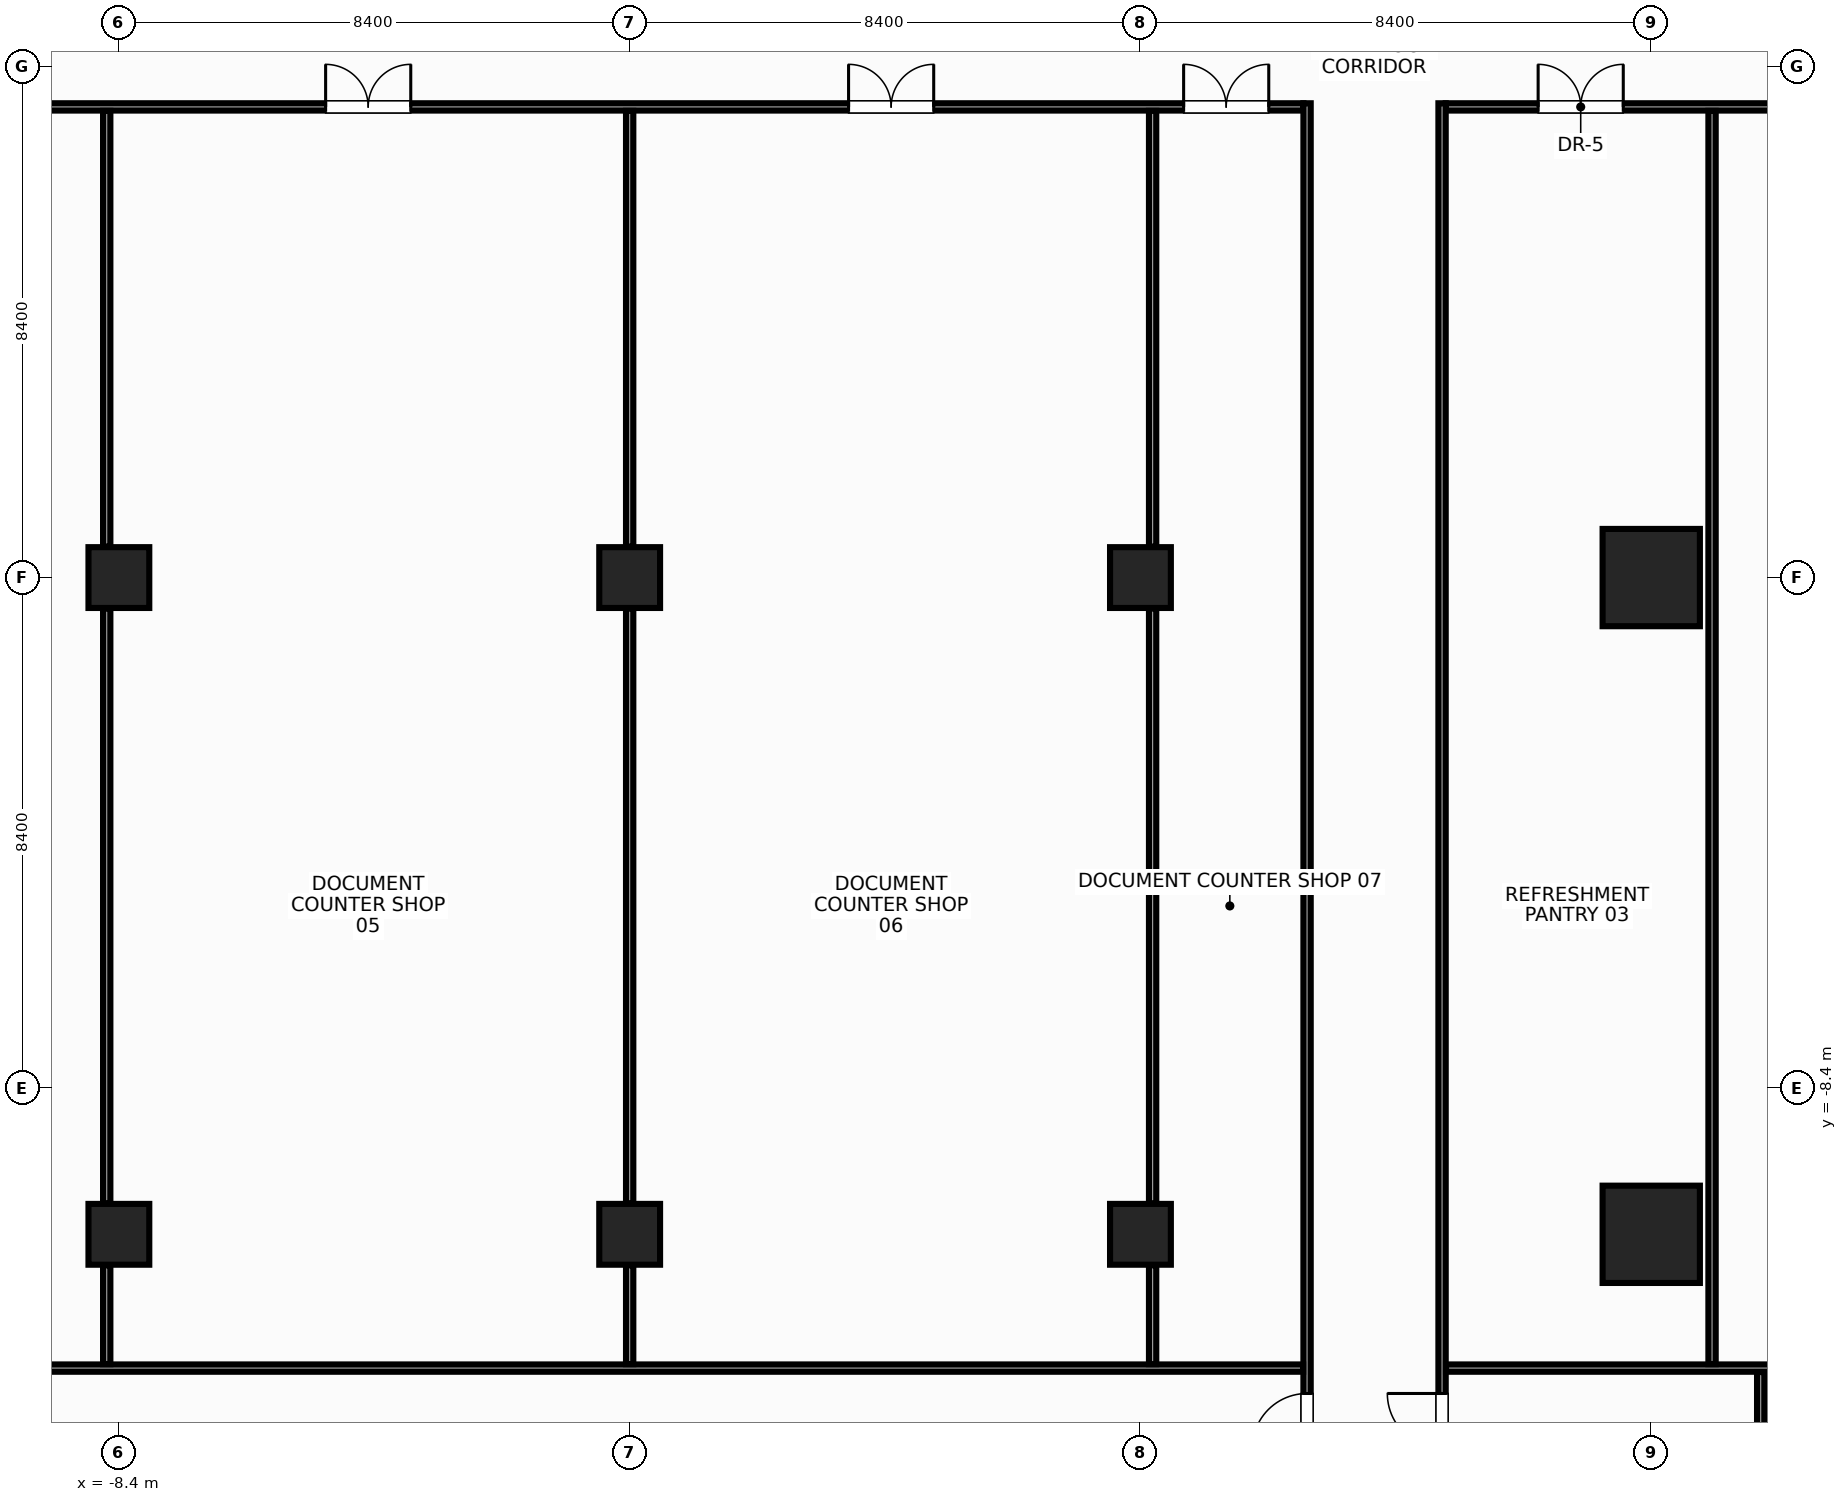
"""IFC4 building model, lengths in metres.
Left out: names, types, materials, properties, quantities, classifications, styles, units other than length and angle.
Written with IfcOpenShell. Run it as: python <this file> out.ifc"""

import sys

from ifc_helpers import new_model, si_unit, direction, frame, frame_2d, origin, origin_2d, place, context, subcontext, project, spatial, rectangle, hollow_rectangle, extrude, source, transform, mapped, element, fill, save


model = new_model("IFC4")
c1 = context("Model", 3, precision=1e-05, world=origin(), true_north=direction((0.0, 1.0)))
c2 = subcontext(c1, "Body", "Model", "MODEL_VIEW")
j1 = project(units=[si_unit("LENGTHUNIT", "METRE"), si_unit("PLANEANGLEUNIT", "RADIAN")], contexts=[c1])
p1 = place(None, origin())
s1 = spatial("IfcSite", under=j1, at=p1, CompositionType="ELEMENT")
p2 = place(p1, origin())
s2 = spatial("IfcBuilding", under=s1, at=p2, CompositionType="ELEMENT")
p3 = place(p2, frame((0.0, 0.0, 178.4)))
s3 = spatial("IfcBuildingStorey", under=s2, at=p3, CompositionType="ELEMENT", Elevation=178.4)
m1 = source(origin(), c2, "Body", "SweptSolid", [
    extrude(rectangle(XDim=1.6, YDim=1.6, at=origin_2d()), origin(), (0.0, 0.0, 1.0), 3.6),
])
for number, where, z_axis, x_axis in (
    (1, (16.8, -10.8, 0.0), (0.0, 0.0, 1.0), (1.0, 0.0, 0.0)),
    (2, (16.8, 0.0, 0.0), (0.0, 0.0, 1.0), (1.0, 0.0, 0.0)),
):
    element("IfcColumn", number, at=place(p3, frame(where, z_axis=z_axis, x_axis=x_axis)), inside=s3, PredefinedType="COLUMN", context=c2, shape_type="MappedRepresentation", body=[
        mapped(m1, transform((0.0, 0.0, 0.0), x_axis=(1.0, 0.0, 0.0), y_axis=(0.0, 1.0, 0.0), z_axis=(0.0, 0.0, 1.0), scale=1.0)),
    ])
m2 = source(origin(), c2, "Body", "SweptSolid", [
    extrude(hollow_rectangle(XDim=1.0, YDim=1.0, WallThickness=0.045, at=origin_2d()), origin(), (0.0, 0.0, 1.0), 3.6),
])
for number, where, z_axis, x_axis in (
    (3, (-8.4, 0.0, 0.0), (0.0, 0.0, 1.0), (1.0, 0.0, 0.0)),
    (4, (-8.4, -10.8, 0.0), (0.0, 0.0, 1.0), (1.0, 0.0, 0.0)),
    (5, (8.4, 0.0, 0.0), (0.0, 0.0, 1.0), (1.0, 0.0, 0.0)),
    (6, (8.4, -10.8, 0.0), (0.0, 0.0, 1.0), (1.0, 0.0, 0.0)),
):
    element("IfcColumn", number, at=place(p3, frame(where, z_axis=z_axis, x_axis=x_axis)), inside=s3, PredefinedType="COLUMN", context=c2, shape_type="MappedRepresentation", body=[
        mapped(m2, transform((0.0, 0.0, 0.0), x_axis=(1.0, 0.0, 0.0), y_axis=(0.0, 1.0, 0.0), z_axis=(0.0, 0.0, 1.0), scale=1.0)),
    ])
m3 = source(origin(), c2, "Body", "SweptSolid", [
    extrude(rectangle(XDim=1.0, YDim=1.0, at=origin_2d()), origin(), (0.0, 0.0, 1.0), 3.6),
])
for number, where, z_axis, x_axis in (
    (7, (0.0, -10.8, 0.0), (0.0, 0.0, 1.0), (1.0, 0.0, 0.0)),
    (8, (0.0, 0.0, 0.0), (0.0, 0.0, 1.0), (1.0, 0.0, 0.0)),
):
    element("IfcColumn", number, at=place(p3, frame(where, z_axis=z_axis, x_axis=x_axis)), inside=s3, PredefinedType="COLUMN", context=c2, shape_type="MappedRepresentation", body=[
        mapped(m3, transform((0.0, 0.0, 0.0), x_axis=(1.0, 0.0, 0.0), y_axis=(0.0, 1.0, 0.0), z_axis=(0.0, 0.0, 1.0), scale=1.0)),
    ])
m4 = source(origin(), c2, "Body", "SweptSolid", [
    extrude(rectangle(XDim=31.6, YDim=0.12, at=frame_2d((15.8, 0.0))), origin(), (0.0, 0.0, 1.0), 2.765),
])
p4 = place(p3, frame((-20.52, 7.74, 0.0), z_axis=(0.0, 0.0, 1.0), x_axis=(1.0, 0.0, 0.0)))
e9 = element("IfcWall", 9, at=p4, inside=s3, PredefinedType="PARTITIONING", context=c2, shape_type="MappedRepresentation", body=[
    mapped(m4, transform((0.0, 0.0, 0.0), x_axis=(1.0, 0.0, 0.0), y_axis=(0.0, 1.0, 0.0), z_axis=(0.0, 0.0, 1.0), scale=1.0)),
])
p5 = place(p4, frame((0.5, 0.0, 0.0)))
e10 = element("IfcOpeningElement", 10, at=p5, cuts=e9, PredefinedType="OPENING", context=c2, shape_type="SweptSolid", body=[
    extrude(rectangle(XDim=0.9, YDim=2.15, at=frame_2d((0.45, 1.075))), frame((0.0, 0.072, 0.0), z_axis=(0.0, -1.0, 0.0), x_axis=(1.0, 0.0, 0.0)), (0.0, 0.0, 1.0), 0.144),
])
p6 = place(p4, frame((6.4, 0.0, 0.0)))
e11 = element("IfcOpeningElement", 11, at=p6, cuts=e9, PredefinedType="OPENING", context=c2, shape_type="SweptSolid", body=[
    extrude(rectangle(XDim=1.4, YDim=2.2, at=frame_2d((0.7, 1.1))), frame((0.0, 0.072, 0.0), z_axis=(0.0, -1.0, 0.0), x_axis=(1.0, 0.0, 0.0)), (0.0, 0.0, 1.0), 0.144),
])
p7 = place(p4, frame((15.52, 0.0, 0.0)))
e12 = element("IfcOpeningElement", 12, at=p7, cuts=e9, PredefinedType="OPENING", context=c2, shape_type="SweptSolid", body=[
    extrude(rectangle(XDim=1.4, YDim=2.2, at=frame_2d((0.7, 1.1))), frame((0.0, 0.072, 0.0), z_axis=(0.0, -1.0, 0.0), x_axis=(1.0, 0.0, 0.0)), (0.0, 0.0, 1.0), 0.144),
])
p8 = place(p4, frame((24.12, 0.0, 0.0)))
e13 = element("IfcOpeningElement", 13, at=p8, cuts=e9, PredefinedType="OPENING", context=c2, shape_type="SweptSolid", body=[
    extrude(rectangle(XDim=1.4, YDim=2.2, at=frame_2d((0.7, 1.1))), frame((0.0, 0.072, 0.0), z_axis=(0.0, -1.0, 0.0), x_axis=(1.0, 0.0, 0.0)), (0.0, 0.0, 1.0), 0.144),
])
p9 = place(p4, frame((29.63, 0.0, 0.0)))
e14 = element("IfcOpeningElement", 14, at=p9, cuts=e9, PredefinedType="OPENING", context=c2, shape_type="SweptSolid", body=[
    extrude(rectangle(XDim=1.4, YDim=2.2, at=frame_2d((0.7, 1.1))), frame((0.0, 0.072, 0.0), z_axis=(0.0, -1.0, 0.0), x_axis=(1.0, 0.0, 0.0)), (0.0, 0.0, 1.0), 0.144),
])
m5 = source(origin(), c2, "Body", "SweptSolid", [
    extrude(rectangle(XDim=7.1, YDim=0.12, at=frame_2d((3.55, 0.0))), origin(), (0.0, 0.0, 1.0), 2.765),
])
p10 = place(p3, frame((13.42, 7.74, 0.0), z_axis=(0.0, 0.0, 1.0), x_axis=(1.0, 0.0, 0.0)))
e15 = element("IfcWall", 15, at=p10, inside=s3, PredefinedType="PARTITIONING", context=c2, shape_type="MappedRepresentation", body=[
    mapped(m5, transform((0.0, 0.0, 0.0), x_axis=(1.0, 0.0, 0.0), y_axis=(0.0, 1.0, 0.0), z_axis=(0.0, 0.0, 1.0), scale=1.0)),
])
p11 = place(p10, frame((5.7, 0.0, 0.0)))
e16 = element("IfcOpeningElement", 16, at=p11, cuts=e15, PredefinedType="OPENING", context=c2, shape_type="SweptSolid", body=[
    extrude(rectangle(XDim=0.9, YDim=2.15, at=frame_2d((0.45, 1.075))), frame((0.0, 0.072, 0.0), z_axis=(0.0, -1.0, 0.0), x_axis=(1.0, 0.0, 0.0)), (0.0, 0.0, 1.0), 0.144),
])
p12 = place(p10, frame((1.52, 0.0, 0.0)))
e17 = element("IfcOpeningElement", 17, at=p12, cuts=e15, PredefinedType="OPENING", context=c2, shape_type="SweptSolid", body=[
    extrude(rectangle(XDim=1.4, YDim=2.2, at=frame_2d((0.7, 1.1))), frame((0.0, 0.072, 0.0), z_axis=(0.0, -1.0, 0.0), x_axis=(1.0, 0.0, 0.0)), (0.0, 0.0, 1.0), 0.144),
])
m6 = source(origin(), c2, "Body", "SweptSolid", [
    extrude(rectangle(XDim=22.595, YDim=0.12, at=frame_2d((11.297, 0.0))), origin(), (0.0, 0.0, 1.0), 2.665),
])
p13 = place(p3, frame((11.14, -14.795, 0.0), z_axis=(0.0, 0.0, 1.0), x_axis=(0.0, 1.0, 0.0)))
e18 = element("IfcWall", 18, at=p13, inside=s3, PredefinedType="PARTITIONING", context=c2, shape_type="MappedRepresentation", body=[
    mapped(m6, transform((0.0, 0.0, 0.0), x_axis=(1.0, 0.0, 0.0), y_axis=(0.0, 1.0, 0.0), z_axis=(0.0, 0.0, 1.0), scale=1.0)),
])
p14 = place(p13, frame((0.478, 0.0, 0.0)))
e19 = element("IfcOpeningElement", 19, at=p14, cuts=e18, PredefinedType="OPENING", context=c2, shape_type="SweptSolid", body=[
    extrude(rectangle(XDim=0.9, YDim=2.15, at=frame_2d((0.45, 1.075))), frame((0.0, 0.072, 0.0), z_axis=(0.0, -1.0, 0.0), x_axis=(1.0, 0.0, 0.0)), (0.0, 0.0, 1.0), 0.144),
])
p15 = place(p3, frame((13.36, -14.795, 0.0), z_axis=(0.0, 0.0, 1.0), x_axis=(0.0, 1.0, 0.0)))
e20 = element("IfcWall", 20, at=p15, inside=s3, PredefinedType="PARTITIONING", context=c2, shape_type="MappedRepresentation", body=[
    mapped(m6, transform((0.0, 0.0, 0.0), x_axis=(1.0, 0.0, 0.0), y_axis=(0.0, 1.0, 0.0), z_axis=(0.0, 0.0, 1.0), scale=1.0)),
])
p16 = place(p15, frame((0.478, 0.0, 0.0)))
e21 = element("IfcOpeningElement", 21, at=p16, cuts=e20, PredefinedType="OPENING", context=c2, shape_type="SweptSolid", body=[
    extrude(rectangle(XDim=0.9, YDim=2.15, at=frame_2d((0.45, 1.075))), frame((0.0, 0.072, 0.0), z_axis=(0.0, -1.0, 0.0), x_axis=(1.0, 0.0, 0.0)), (0.0, 0.0, 1.0), 0.144),
])
m7 = source(origin(), c2, "Body", "SweptSolid", [
    extrude(rectangle(XDim=34.925, YDim=0.12, at=frame_2d((17.462, 0.0))), origin(), (0.0, 0.0, 1.0), 2.965),
])
p17 = place(p3, frame((-23.85, -13.0, 0.0), z_axis=(0.0, 0.0, 1.0), x_axis=(1.0, 0.0, 0.0)))
e22 = element("IfcWall", 22, at=p17, inside=s3, PredefinedType="PARTITIONING", context=c2, shape_type="MappedRepresentation", body=[
    mapped(m7, transform((0.0, 0.0, 0.0), x_axis=(1.0, 0.0, 0.0), y_axis=(0.0, 1.0, 0.0), z_axis=(0.0, 0.0, 1.0), scale=1.0)),
])
p18 = place(p17, frame((1.515, 0.0, 0.0)))
e23 = element("IfcOpeningElement", 23, at=p18, cuts=e22, PredefinedType="OPENING", context=c2, shape_type="SweptSolid", body=[
    extrude(rectangle(XDim=1.4, YDim=2.2, at=frame_2d((0.7, 1.1))), frame((0.0, 0.072, 0.0), z_axis=(0.0, -1.0, 0.0), x_axis=(1.0, 0.0, 0.0)), (0.0, 0.0, 1.0), 0.144),
])
p19 = place(p17, frame((8.15, 0.0, 0.0)))
e24 = element("IfcOpeningElement", 24, at=p19, cuts=e22, PredefinedType="OPENING", context=c2, shape_type="SweptSolid", body=[
    extrude(rectangle(XDim=1.4, YDim=2.2, at=frame_2d((0.7, 1.1))), frame((0.0, 0.072, 0.0), z_axis=(0.0, -1.0, 0.0), x_axis=(1.0, 0.0, 0.0)), (0.0, 0.0, 1.0), 0.144),
])
m8 = source(origin(), c2, "Body", "SweptSolid", [
    extrude(rectangle(XDim=10.425, YDim=0.12, at=frame_2d((5.212, 0.0))), origin(), (0.0, 0.0, 1.0), 2.965),
])
p20 = place(p3, frame((13.425, -13.0, 0.0), z_axis=(0.0, 0.0, 1.0), x_axis=(1.0, 0.0, 0.0)))
e25 = element("IfcWall", 25, at=p20, inside=s3, PredefinedType="PARTITIONING", context=c2, shape_type="MappedRepresentation", body=[
    mapped(m8, transform((0.0, 0.0, 0.0), x_axis=(1.0, 0.0, 0.0), y_axis=(0.0, 1.0, 0.0), z_axis=(0.0, 0.0, 1.0), scale=1.0)),
])
p21 = place(p20, frame((7.51, 0.0, 0.0)))
e26 = element("IfcOpeningElement", 26, at=p21, cuts=e25, PredefinedType="OPENING", context=c2, shape_type="SweptSolid", body=[
    extrude(rectangle(XDim=1.4, YDim=2.2, at=frame_2d((0.7, 1.1))), frame((0.0, 0.072, 0.0), z_axis=(0.0, -1.0, 0.0), x_axis=(1.0, 0.0, 0.0)), (0.0, 0.0, 1.0), 0.144),
])
m9 = source(origin(), c2, "Body", "SweptSolid", [
    extrude(rectangle(XDim=1.625, YDim=0.12, at=frame_2d((0.812, 0.0))), origin(), (0.0, 0.0, 1.0), 2.965),
])
p22 = place(p3, frame((-8.6, -12.935, 0.0), z_axis=(0.0, 0.0, 1.0), x_axis=(0.0, 1.0, 0.0)))
e27 = element("IfcWall", 27, at=p22, inside=s3, PredefinedType="PARTITIONING", context=c2, shape_type="MappedRepresentation", body=[
    mapped(m9, transform((0.0, 0.0, 0.0), x_axis=(1.0, 0.0, 0.0), y_axis=(0.0, 1.0, 0.0), z_axis=(0.0, 0.0, 1.0), scale=1.0)),
])
m10 = source(origin(), c2, "Body", "SweptSolid", [
    extrude(rectangle(XDim=9.78, YDim=0.12, at=frame_2d((4.89, 0.0))), origin(), (0.0, 0.0, 1.0), 2.765),
])
p23 = place(p3, frame((-8.6, -10.29, 0.0), z_axis=(0.0, 0.0, 1.0), x_axis=(0.0, 1.0, 0.0)))
e28 = element("IfcWall", 28, at=p23, inside=s3, PredefinedType="PARTITIONING", context=c2, shape_type="MappedRepresentation", body=[
    mapped(m10, transform((0.0, 0.0, 0.0), x_axis=(1.0, 0.0, 0.0), y_axis=(0.0, 1.0, 0.0), z_axis=(0.0, 0.0, 1.0), scale=1.0)),
])
m11 = source(origin(), c2, "Body", "SweptSolid", [
    extrude(rectangle(XDim=7.165, YDim=0.12, at=frame_2d((3.583, 0.0))), origin(), (0.0, 0.0, 1.0), 2.665),
])
p24 = place(p3, frame((-8.6, 0.51, 0.0), z_axis=(0.0, 0.0, 1.0), x_axis=(0.0, 1.0, 0.0)))
e29 = element("IfcWall", 29, at=p24, inside=s3, PredefinedType="PARTITIONING", context=c2, shape_type="MappedRepresentation", body=[
    mapped(m11, transform((0.0, 0.0, 0.0), x_axis=(1.0, 0.0, 0.0), y_axis=(0.0, 1.0, 0.0), z_axis=(0.0, 0.0, 1.0), scale=1.0)),
])
p25 = place(p3, frame((0.0, -12.935, 0.0), z_axis=(0.0, 0.0, 1.0), x_axis=(0.0, 1.0, 0.0)))
e30 = element("IfcWall", 30, at=p25, inside=s3, PredefinedType="PARTITIONING", context=c2, shape_type="MappedRepresentation", body=[
    mapped(m9, transform((0.0, 0.0, 0.0), x_axis=(1.0, 0.0, 0.0), y_axis=(0.0, 1.0, 0.0), z_axis=(0.0, 0.0, 1.0), scale=1.0)),
])
p26 = place(p3, frame((0.0, -10.29, 0.0), z_axis=(0.0, 0.0, 1.0), x_axis=(0.0, 1.0, 0.0)))
e31 = element("IfcWall", 31, at=p26, inside=s3, PredefinedType="PARTITIONING", context=c2, shape_type="MappedRepresentation", body=[
    mapped(m10, transform((0.0, 0.0, 0.0), x_axis=(1.0, 0.0, 0.0), y_axis=(0.0, 1.0, 0.0), z_axis=(0.0, 0.0, 1.0), scale=1.0)),
])
p27 = place(p3, frame((0.0, 0.51, 0.0), z_axis=(0.0, 0.0, 1.0), x_axis=(0.0, 1.0, 0.0)))
e32 = element("IfcWall", 32, at=p27, inside=s3, PredefinedType="PARTITIONING", context=c2, shape_type="MappedRepresentation", body=[
    mapped(m11, transform((0.0, 0.0, 0.0), x_axis=(1.0, 0.0, 0.0), y_axis=(0.0, 1.0, 0.0), z_axis=(0.0, 0.0, 1.0), scale=1.0)),
])
p28 = place(p3, frame((8.6, -12.935, 0.0), z_axis=(0.0, 0.0, 1.0), x_axis=(0.0, 1.0, 0.0)))
e33 = element("IfcWall", 33, at=p28, inside=s3, PredefinedType="PARTITIONING", context=c2, shape_type="MappedRepresentation", body=[
    mapped(m9, transform((0.0, 0.0, 0.0), x_axis=(1.0, 0.0, 0.0), y_axis=(0.0, 1.0, 0.0), z_axis=(0.0, 0.0, 1.0), scale=1.0)),
])
p29 = place(p3, frame((8.6, -10.29, 0.0), z_axis=(0.0, 0.0, 1.0), x_axis=(0.0, 1.0, 0.0)))
e34 = element("IfcWall", 34, at=p29, inside=s3, PredefinedType="PARTITIONING", context=c2, shape_type="MappedRepresentation", body=[
    mapped(m10, transform((0.0, 0.0, 0.0), x_axis=(1.0, 0.0, 0.0), y_axis=(0.0, 1.0, 0.0), z_axis=(0.0, 0.0, 1.0), scale=1.0)),
])
p30 = place(p3, frame((8.6, 0.51, 0.0), z_axis=(0.0, 0.0, 1.0), x_axis=(0.0, 1.0, 0.0)))
e35 = element("IfcWall", 35, at=p30, inside=s3, PredefinedType="PARTITIONING", context=c2, shape_type="MappedRepresentation", body=[
    mapped(m11, transform((0.0, 0.0, 0.0), x_axis=(1.0, 0.0, 0.0), y_axis=(0.0, 1.0, 0.0), z_axis=(0.0, 0.0, 1.0), scale=1.0)),
])
m12 = source(origin(), c2, "Body", "SweptSolid", [
    extrude(rectangle(XDim=20.61, YDim=0.12, at=frame_2d((10.305, 0.0))), origin(), (0.0, 0.0, 1.0), 2.915),
])
p31 = place(p3, frame((17.8, -12.935, 0.0), z_axis=(0.0, 0.0, 1.0), x_axis=(0.0, 1.0, 0.0)))
e36 = element("IfcWall", 36, at=p31, inside=s3, PredefinedType="PARTITIONING", context=c2, shape_type="MappedRepresentation", body=[
    mapped(m12, transform((0.0, 0.0, 0.0), x_axis=(1.0, 0.0, 0.0), y_axis=(0.0, 1.0, 0.0), z_axis=(0.0, 0.0, 1.0), scale=1.0)),
])
m13 = source(origin(), c2, "Body", "SweptSolid", [
    extrude(rectangle(XDim=4.597, YDim=0.12, at=frame_2d((2.299, 0.0))), origin(), (0.0, 0.0, 1.0), 3.38),
])
p32 = place(p3, frame((18.6, -17.662, 0.0), z_axis=(0.0, 0.0, 1.0), x_axis=(0.0, 1.0, 0.0)))
e37 = element("IfcWall", 37, at=p32, inside=s3, PredefinedType="PARTITIONING", context=c2, shape_type="MappedRepresentation", body=[
    mapped(m13, transform((0.0, 0.0, 0.0), x_axis=(1.0, 0.0, 0.0), y_axis=(0.0, 1.0, 0.0), z_axis=(0.0, 0.0, 1.0), scale=1.0)),
])
m14 = source(origin(), c2, "Body", "SweptSolid", [
    extrude(rectangle(XDim=1.4, YDim=2.2, at=frame_2d((0.7, 1.1))), frame((0.0, 0.025, 0.0), z_axis=(0.0, -1.0, 0.0), x_axis=(1.0, 0.0, 0.0)), (0.0, 0.0, 1.0), 0.05),
])
p33 = place(p12, origin())
e38 = element("IfcDoor", 38, at=p33, inside=s3, OperationType="DOUBLE_DOOR_SINGLE_SWING", PredefinedType="DOOR", context=c2, shape_type="MappedRepresentation", body=[
    mapped(m14, transform((0.0, 0.0, 0.0), x_axis=(1.0, 0.0, 0.0), y_axis=(0.0, 1.0, 0.0), z_axis=(0.0, 0.0, 1.0), scale=1.0)),
])
fill(e17, e38)
p34 = place(p7, origin())
e39 = element("IfcDoor", 39, at=p34, inside=s3, OperationType="DOUBLE_DOOR_SINGLE_SWING", PredefinedType="DOOR", context=c2, shape_type="MappedRepresentation", body=[
    mapped(m14, transform((0.0, 0.0, 0.0), x_axis=(1.0, 0.0, 0.0), y_axis=(0.0, 1.0, 0.0), z_axis=(0.0, 0.0, 1.0), scale=1.0)),
])
fill(e12, e39)
p35 = place(p8, origin())
e40 = element("IfcDoor", 40, at=p35, inside=s3, OperationType="DOUBLE_DOOR_SINGLE_SWING", PredefinedType="DOOR", context=c2, shape_type="MappedRepresentation", body=[
    mapped(m14, transform((0.0, 0.0, 0.0), x_axis=(1.0, 0.0, 0.0), y_axis=(0.0, 1.0, 0.0), z_axis=(0.0, 0.0, 1.0), scale=1.0)),
])
fill(e13, e40)
p36 = place(p9, origin())
e41 = element("IfcDoor", 41, at=p36, inside=s3, OperationType="DOUBLE_DOOR_SINGLE_SWING", PredefinedType="DOOR", context=c2, shape_type="MappedRepresentation", body=[
    mapped(m14, transform((0.0, 0.0, 0.0), x_axis=(1.0, 0.0, 0.0), y_axis=(0.0, 1.0, 0.0), z_axis=(0.0, 0.0, 1.0), scale=1.0)),
])
fill(e14, e41)
m15 = source(origin(), c2, "Body", "SweptSolid", [
    extrude(rectangle(XDim=0.9, YDim=2.15, at=frame_2d((0.45, 1.075))), frame((0.0, 0.025, 0.0), z_axis=(0.0, -1.0, 0.0), x_axis=(1.0, 0.0, 0.0)), (0.0, 0.0, 1.0), 0.05),
])
p37 = place(p14, origin())
e42 = element("IfcDoor", 42, at=p37, inside=s3, OperationType="SINGLE_SWING_LEFT", PredefinedType="DOOR", context=c2, shape_type="MappedRepresentation", body=[
    mapped(m15, transform((0.0, 0.0, 0.0), x_axis=(1.0, 0.0, 0.0), y_axis=(0.0, 1.0, 0.0), z_axis=(0.0, 0.0, 1.0), scale=1.0)),
])
fill(e19, e42)
p38 = place(p16, origin())
e43 = element("IfcDoor", 43, at=p38, inside=s3, OperationType="SINGLE_SWING_RIGHT", PredefinedType="DOOR", context=c2, shape_type="MappedRepresentation", body=[
    mapped(m15, transform((0.0, 0.0, 0.0), x_axis=(1.0, 0.0, 0.0), y_axis=(0.0, 1.0, 0.0), z_axis=(0.0, 0.0, 1.0), scale=1.0)),
])
fill(e21, e43)
save(model, sys.argv[1])
